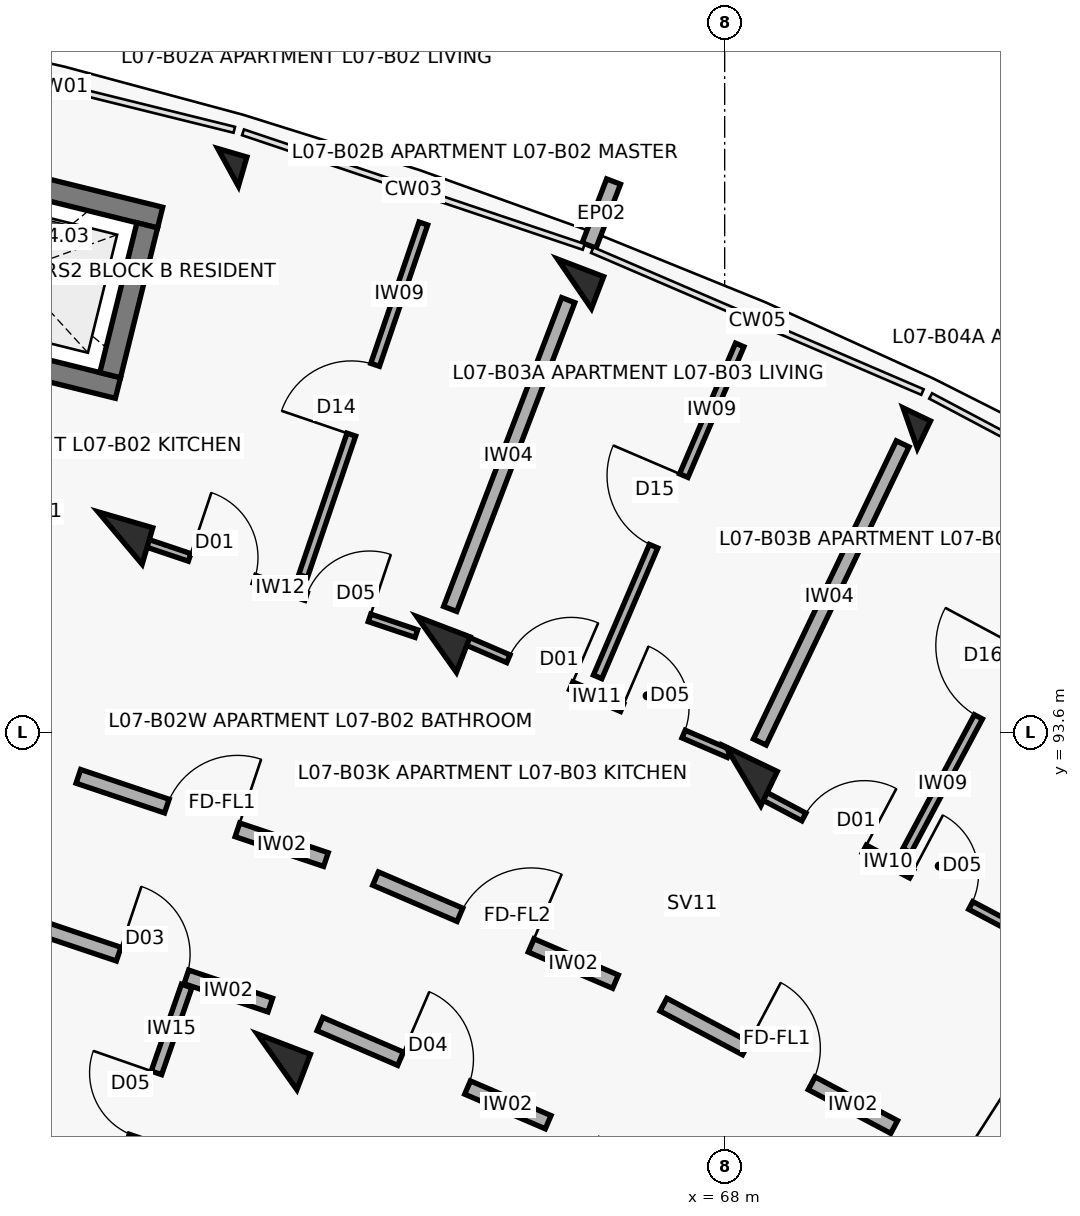
"""IFC4 building model, lengths in metres.
Left out: names, types, materials, properties, quantities, classifications, styles, units other than length and angle.
Written with IfcOpenShell. Run it as: python <this file> out.ifc"""

import sys

from ifc_helpers import new_model, si_unit, direction, frame, frame_2d, origin, origin_2d, place, context, subcontext, project, spatial, rectangle, extrude, element, fill, save


model = new_model("IFC4")
c1 = context("Model", 3, precision=1e-05, world=origin(), true_north=direction((0.0, 1.0)))
c2 = subcontext(c1, "Body", "Model", "MODEL_VIEW")
j1 = project(units=[si_unit("LENGTHUNIT", "METRE"), si_unit("PLANEANGLEUNIT", "RADIAN")], contexts=[c1])
p1 = place(None, origin())
s1 = spatial("IfcSite", under=j1, at=p1, CompositionType="ELEMENT")
p2 = place(p1, origin())
s2 = spatial("IfcBuilding", under=s1, at=p2, CompositionType="ELEMENT")
p3 = place(p2, frame((0.0, 0.0, 23.6)))
s3 = spatial("IfcBuildingStorey", under=s2, at=p3, CompositionType="ELEMENT", Elevation=23.6)
p4 = place(p3, frame((60.046, 96.153, 0.0), z_axis=(0.0, 0.0, 1.0), x_axis=(0.27966144946, 0.96009867914, 0.0)))
e1 = element("IfcColumn", 1, at=p4, inside=s3, PredefinedType="COLUMN", context=c2, shape_type="SweptSolid", body=[
    extrude(rectangle(XDim=0.5, YDim=0.75, at=origin_2d()), origin(), (0.0, 0.0, 1.0), 3.1),
])
p5 = place(p3, frame((61.467, 101.031, 0.0), z_axis=(0.0, 0.0, 1.0), x_axis=(0.27966144946, 0.96009867914, 0.0)))
e2 = element("IfcColumn", 2, at=p5, inside=s3, PredefinedType="COLUMN", context=c2, shape_type="SweptSolid", body=[
    extrude(rectangle(XDim=0.4, YDim=0.4, at=origin_2d()), origin(), (0.0, 0.0, 1.0), 3.1),
])
for number, where, z_axis, x_axis in (
    (3, (62.111, 89.261, 0.0), (0.0, 0.0, 1.0), (0.357, 0.934, 0.0)),
    (4, (64.21, 94.753, 0.0), (0.0, 0.0, 1.0), (0.357, 0.934, 0.0)),
):
    element("IfcColumn", number, at=place(p3, frame(where, z_axis=z_axis, x_axis=x_axis)), inside=s3, PredefinedType="COLUMN", context=c2, shape_type="SweptSolid", body=[
        extrude(rectangle(XDim=0.5, YDim=0.75, at=origin_2d()), origin(), (0.0, 0.0, 1.0), 3.1),
    ])
p6 = place(p3, frame((66.024, 99.499, 0.0), z_axis=(0.0, 0.0, 1.0), x_axis=(0.357064076459, 0.934079892355, 0.0)))
e5 = element("IfcColumn", 5, at=p6, inside=s3, PredefinedType="COLUMN", context=c2, shape_type="SweptSolid", body=[
    extrude(rectangle(XDim=0.45, YDim=0.65, at=origin_2d()), origin(), (0.0, 0.0, 1.0), 3.1),
])
p7 = place(p3, frame((68.246, 93.019, 0.0), z_axis=(0.0, 0.0, 1.0), x_axis=(0.432085748802, 0.901832526405, 0.0)))
e6 = element("IfcColumn", 6, at=p7, inside=s3, PredefinedType="COLUMN", context=c2, shape_type="SweptSolid", body=[
    extrude(rectangle(XDim=0.5, YDim=0.75, at=origin_2d()), origin(), (0.0, 0.0, 1.0), 3.1),
])
p8 = place(p3, frame((70.441, 97.6, 0.0), z_axis=(0.0, 0.0, 1.0), x_axis=(0.432085748802, 0.901832526405, 0.0)))
e7 = element("IfcColumn", 7, at=p8, inside=s3, PredefinedType="COLUMN", context=c2, shape_type="SweptSolid", body=[
    extrude(rectangle(XDim=0.4, YDim=0.4, at=origin_2d()), origin(), (0.0, 0.0, 1.0), 3.1),
])
p9 = place(p3, frame((66.217, 100.003, 0.0), z_axis=(0.0, 0.0, 1.0), x_axis=(0.356942580168, 0.934126326823, 0.0)))
e8 = element("IfcWall", 8, at=p9, inside=s3, PredefinedType="PARAPET", context=c2, shape_type="SweptSolid", body=[
    extrude(rectangle(XDim=0.9, YDim=0.195, at=frame_2d((0.45, 0.0))), origin(), (0.0, 0.0, 1.0), 2.25),
])
p10 = place(p3, frame((60.018, 98.128, 0.0), z_axis=(0.0, 0.0, 1.0), x_axis=(-0.970707542441, 0.240264160972, 0.0)))
e9 = element("IfcWall", 9, at=p10, inside=s3, PredefinedType="SHEAR", context=c2, shape_type="SweptSolid", body=[
    extrude(rectangle(XDim=3.39, YDim=0.28, at=frame_2d((1.695, 0.0))), origin(), (0.0, 0.0, 1.0), 3.1),
])
p11 = place(p10, frame((1.095, 0.0, 0.0)))
e10 = element("IfcOpeningElement", 10, at=p11, cuts=e9, PredefinedType="OPENING", context=c2, shape_type="SweptSolid", body=[
    extrude(rectangle(XDim=1.2, YDim=2.15, at=frame_2d((0.6, 1.075))), frame((0.0, 0.15, 0.0), z_axis=(0.0, -1.0, 0.0), x_axis=(1.0, 0.0, 0.0)), (0.0, 0.0, 1.0), 0.3),
])
p12 = place(p3, frame((60.573, 100.37, 0.0), z_axis=(0.0, 0.0, 1.0), x_axis=(-0.970711699588, 0.240247364777, 0.0)))
e11 = element("IfcWall", 11, at=p12, inside=s3, PredefinedType="SHEAR", context=c2, shape_type="SweptSolid", body=[
    extrude(rectangle(XDim=3.39, YDim=0.28, at=frame_2d((1.695, 0.0))), origin(), (0.0, 0.0, 1.0), 3.1),
])
p13 = place(p3, frame((59.915, 98.297, 0.0), z_axis=(0.0, 0.0, 1.0), x_axis=(0.2402993748, 0.970698825832, 0.0)))
e12 = element("IfcWall", 12, at=p13, inside=s3, PredefinedType="SHEAR", context=c2, shape_type="SweptSolid", body=[
    extrude(rectangle(XDim=2.03, YDim=0.28, at=frame_2d((1.015, 0.0))), origin(), (0.0, 0.0, 1.0), 3.1),
])
p14 = place(p3, frame((59.497, 93.018, 0.0), z_axis=(0.0, 0.0, 1.0), x_axis=(0.947863007629, -0.318678080151, 0.0)))
e13 = element("IfcWall", 13, at=p14, inside=s3, PredefinedType="SOLIDWALL", context=c2, shape_type="SweptSolid", body=[
    extrude(rectangle(XDim=3.436, YDim=0.19, at=frame_2d((1.718, 0.0))), origin(), (0.0, 0.0, 1.0), 2.08),
])
p15 = place(p14, frame((1.228, 0.0, 0.0)))
e14 = element("IfcOpeningElement", 14, at=p15, cuts=e13, PredefinedType="OPENING", context=c2, shape_type="SweptSolid", body=[
    extrude(rectangle(XDim=0.98, YDim=2.15, at=frame_2d((0.49, 1.075))), frame((0.0, 0.105, 0.0), z_axis=(0.0, -1.0, 0.0), x_axis=(1.0, 0.0, 0.0)), (0.0, 0.0, 1.0), 0.21),
])
p16 = place(p3, frame((58.923, 91.049, 0.0), z_axis=(0.0, 0.0, 1.0), x_axis=(0.94787351033, -0.318646839643, 0.0)))
e15 = element("IfcWall", 15, at=p16, inside=s3, PredefinedType="SOLIDWALL", context=c2, shape_type="SweptSolid", body=[
    extrude(rectangle(XDim=3.269, YDim=0.19, at=frame_2d((1.634, 0.0))), origin(), (0.0, 0.0, 1.0), 2.08),
])
p17 = place(p16, frame((1.164, 0.0, 0.0)))
e16 = element("IfcOpeningElement", 16, at=p17, cuts=e15, PredefinedType="OPENING", context=c2, shape_type="SweptSolid", body=[
    extrude(rectangle(XDim=0.94, YDim=2.1, at=frame_2d((0.47, 1.05))), frame((0.0, 0.105, 0.0), z_axis=(0.0, -1.0, 0.0), x_axis=(1.0, 0.0, 0.0)), (0.0, 0.0, 1.0), 0.21),
])
p18 = place(p3, frame((59.837, 87.143, 0.0), z_axis=(0.0, 0.0, 1.0), x_axis=(0.328629662527, 0.944458863534, 0.0)))
e17 = element("IfcWall", 17, at=p18, inside=s3, PredefinedType="PARTITIONING", context=c2, shape_type="SweptSolid", body=[
    extrude(rectangle(XDim=3.3, YDim=0.145, at=frame_2d((1.65, 0.0))), origin(), (0.0, 0.0, 1.0), 2.08),
])
p19 = place(p18, frame((1.21, 0.0, 0.0)))
e18 = element("IfcOpeningElement", 18, at=p19, cuts=e17, PredefinedType="OPENING", context=c2, shape_type="SweptSolid", body=[
    extrude(rectangle(XDim=0.88, YDim=2.1, at=frame_2d((0.44, 1.05))), frame((0.0, 0.083, 0.0), z_axis=(0.0, -1.0, 0.0), x_axis=(1.0, 0.0, 0.0)), (0.0, 0.0, 1.0), 0.165),
])
p20 = place(p3, frame((60.344, 96.106, 0.0), z_axis=(0.0, 0.0, 1.0), x_axis=(0.947876567739, -0.318637744673, 0.0)))
e19 = element("IfcWall", 19, at=p20, inside=s3, PredefinedType="PARTITIONING", context=c2, shape_type="SweptSolid", body=[
    extrude(rectangle(XDim=3.797, YDim=0.105, at=frame_2d((1.899, 0.0))), origin(), (0.0, 0.0, 1.0), 2.08),
])
p21 = place(p20, frame((0.65, 0.0, 0.0)))
e20 = element("IfcOpeningElement", 20, at=p21, cuts=e19, PredefinedType="OPENING", context=c2, shape_type="SweptSolid", body=[
    extrude(rectangle(XDim=0.9, YDim=2.1, at=frame_2d((0.45, 1.05))), frame((0.0, 0.062, 0.0), z_axis=(0.0, -1.0, 0.0), x_axis=(1.0, 0.0, 0.0)), (0.0, 0.0, 1.0), 0.125),
])
p22 = place(p20, frame((2.267, 0.0, 0.0)))
e21 = element("IfcOpeningElement", 21, at=p22, cuts=e19, PredefinedType="OPENING", context=c2, shape_type="SweptSolid", body=[
    extrude(rectangle(XDim=0.88, YDim=2.1, at=frame_2d((0.44, 1.05))), frame((0.0, 0.062, 0.0), z_axis=(0.0, -1.0, 0.0), x_axis=(1.0, 0.0, 0.0)), (0.0, 0.0, 1.0), 0.125),
])
p23 = place(p3, frame((62.453, 95.655, 0.0), z_axis=(0.0, 0.0, 1.0), x_axis=(0.322916379302, 0.946427499589, 0.0)))
e22 = element("IfcWall", 22, at=p23, inside=s3, PredefinedType="PARTITIONING", context=c2, shape_type="SweptSolid", body=[
    extrude(rectangle(XDim=4.9, YDim=0.12, at=frame_2d((2.45, 0.0))), origin(), (0.0, 0.0, 1.0), 2.08),
])
p24 = place(p23, frame((1.965, 0.0, 0.0)))
e23 = element("IfcOpeningElement", 23, at=p24, cuts=e22, PredefinedType="OPENING", context=c2, shape_type="SweptSolid", body=[
    extrude(rectangle(XDim=0.97, YDim=2.1, at=frame_2d((0.485, 1.05))), frame((0.0, 0.07, 0.0), z_axis=(0.0, -1.0, 0.0), x_axis=(1.0, 0.0, 0.0)), (0.0, 0.0, 1.0), 0.14),
])
p25 = place(p3, frame((63.407, 91.673, 0.0), z_axis=(0.0, 0.0, 1.0), x_axis=(0.918718172399, -0.394913813008, 0.0)))
e24 = element("IfcWall", 24, at=p25, inside=s3, PredefinedType="SOLIDWALL", context=c2, shape_type="SweptSolid", body=[
    extrude(rectangle(XDim=3.436, YDim=0.19, at=frame_2d((1.718, 0.0))), origin(), (0.0, 0.0, 1.0), 2.08),
])
p26 = place(p25, frame((1.208, 0.0, 0.0)))
e25 = element("IfcOpeningElement", 25, at=p26, cuts=e24, PredefinedType="OPENING", context=c2, shape_type="SweptSolid", body=[
    extrude(rectangle(XDim=1.02, YDim=2.15, at=frame_2d((0.51, 1.075))), frame((0.0, 0.105, 0.0), z_axis=(0.0, -1.0, 0.0), x_axis=(1.0, 0.0, 0.0)), (0.0, 0.0, 1.0), 0.21),
])
p27 = place(p3, frame((62.675, 89.758, 0.0), z_axis=(0.0, 0.0, 1.0), x_axis=(0.918723391052, -0.394901672235, 0.0)))
e26 = element("IfcWall", 26, at=p27, inside=s3, PredefinedType="SOLIDWALL", context=c2, shape_type="SweptSolid", body=[
    extrude(rectangle(XDim=3.269, YDim=0.19, at=frame_2d((1.634, 0.0))), origin(), (0.0, 0.0, 1.0), 2.08),
])
p28 = place(p27, frame((1.154, 0.0, 0.0)))
e27 = element("IfcOpeningElement", 27, at=p28, cuts=e26, PredefinedType="OPENING", context=c2, shape_type="SweptSolid", body=[
    extrude(rectangle(XDim=0.96, YDim=2.1, at=frame_2d((0.48, 1.05))), frame((0.0, 0.105, 0.0), z_axis=(0.0, -1.0, 0.0), x_axis=(1.0, 0.0, 0.0)), (0.0, 0.0, 1.0), 0.21),
])
p29 = place(p3, frame((64.557, 94.822, 0.0), z_axis=(0.0, 0.0, 1.0), x_axis=(0.918726854017, -0.394893615684, 0.0)))
e28 = element("IfcWall", 28, at=p29, inside=s3, PredefinedType="PARTITIONING", context=c2, shape_type="SweptSolid", body=[
    extrude(rectangle(XDim=3.81, YDim=0.11, at=frame_2d((1.905, 0.0))), origin(), (0.0, 0.0, 1.0), 2.08),
])
p30 = place(p29, frame((0.65, 0.0, 0.0)))
e29 = element("IfcOpeningElement", 29, at=p30, cuts=e28, PredefinedType="OPENING", context=c2, shape_type="SweptSolid", body=[
    extrude(rectangle(XDim=0.9, YDim=2.1, at=frame_2d((0.45, 1.05))), frame((0.0, 0.065, 0.0), z_axis=(0.0, -1.0, 0.0), x_axis=(1.0, 0.0, 0.0)), (0.0, 0.0, 1.0), 0.13),
])
p31 = place(p29, frame((2.28, 0.0, 0.0)))
e30 = element("IfcOpeningElement", 30, at=p31, cuts=e28, PredefinedType="OPENING", context=c2, shape_type="SweptSolid", body=[
    extrude(rectangle(XDim=0.88, YDim=2.1, at=frame_2d((0.44, 1.05))), frame((0.0, 0.065, 0.0), z_axis=(0.0, -1.0, 0.0), x_axis=(1.0, 0.0, 0.0)), (0.0, 0.0, 1.0), 0.13),
])
p32 = place(p3, frame((66.329, 94.327, 0.0), z_axis=(0.0, 0.0, 1.0), x_axis=(0.393553279267, 0.919301809189, 0.0)))
e31 = element("IfcWall", 31, at=p32, inside=s3, PredefinedType="PARTITIONING", context=c2, shape_type="SweptSolid", body=[
    extrude(rectangle(XDim=4.75, YDim=0.12, at=frame_2d((2.375, 0.0))), origin(), (0.0, 0.0, 1.0), 2.08),
])
p33 = place(p32, frame((1.87, 0.0, 0.0)))
e32 = element("IfcOpeningElement", 32, at=p33, cuts=e31, PredefinedType="OPENING", context=c2, shape_type="SweptSolid", body=[
    extrude(rectangle(XDim=1.01, YDim=2.1, at=frame_2d((0.505, 1.05))), frame((0.0, 0.07, 0.0), z_axis=(0.0, -1.0, 0.0), x_axis=(1.0, 0.0, 0.0)), (0.0, 0.0, 1.0), 0.14),
])
p34 = place(p3, frame((64.389, 95.22, 0.0), z_axis=(0.0, 0.0, 1.0), x_axis=(0.357064016205, 0.934079915388, 0.0)))
e33 = element("IfcWall", 33, at=p34, inside=s3, PredefinedType="SOLIDWALL", context=c2, shape_type="SweptSolid", body=[
    extrude(rectangle(XDim=4.35, YDim=0.185, at=frame_2d((2.175, 0.0))), origin(), (0.0, 0.0, 1.0), 2.08),
])
p35 = place(p3, frame((67.194, 90.014, 0.0), z_axis=(0.0, 0.0, 1.0), x_axis=(0.883410853063, -0.468599258099, 0.0)))
e34 = element("IfcWall", 34, at=p35, inside=s3, PredefinedType="SOLIDWALL", context=c2, shape_type="SweptSolid", body=[
    extrude(rectangle(XDim=3.436, YDim=0.19, at=frame_2d((1.718, 0.0))), origin(), (0.0, 0.0, 1.0), 2.08),
])
p36 = place(p35, frame((1.228, 0.0, 0.0)))
e35 = element("IfcOpeningElement", 35, at=p36, cuts=e34, PredefinedType="OPENING", context=c2, shape_type="SweptSolid", body=[
    extrude(rectangle(XDim=0.98, YDim=2.15, at=frame_2d((0.49, 1.075))), frame((0.0, 0.105, 0.0), z_axis=(0.0, -1.0, 0.0), x_axis=(1.0, 0.0, 0.0)), (0.0, 0.0, 1.0), 0.21),
])
p37 = place(p3, frame((68.468, 92.788, 0.0), z_axis=(0.0, 0.0, 1.0), x_axis=(0.883450371448, -0.468524749814, 0.0)))
e36 = element("IfcWall", 36, at=p37, inside=s3, PredefinedType="PARTITIONING", context=c2, shape_type="SweptSolid", body=[
    extrude(rectangle(XDim=3.785, YDim=0.115, at=frame_2d((1.893, 0.0))), origin(), (0.0, 0.0, 1.0), 2.08),
])
p38 = place(p37, frame((0.65, 0.0, 0.0)))
e37 = element("IfcOpeningElement", 37, at=p38, cuts=e36, PredefinedType="OPENING", context=c2, shape_type="SweptSolid", body=[
    extrude(rectangle(XDim=0.9, YDim=2.1, at=frame_2d((0.45, 1.05))), frame((0.0, 0.067, 0.0), z_axis=(0.0, -1.0, 0.0), x_axis=(1.0, 0.0, 0.0)), (0.0, 0.0, 1.0), 0.135),
])
p39 = place(p37, frame((2.255, 0.0, 0.0)))
e38 = element("IfcOpeningElement", 38, at=p39, cuts=e36, PredefinedType="OPENING", context=c2, shape_type="SweptSolid", body=[
    extrude(rectangle(XDim=0.88, YDim=2.1, at=frame_2d((0.44, 1.05))), frame((0.0, 0.067, 0.0), z_axis=(0.0, -1.0, 0.0), x_axis=(1.0, 0.0, 0.0)), (0.0, 0.0, 1.0), 0.135),
])
p40 = place(p3, frame((70.398, 92.041, 0.0), z_axis=(0.0, 0.0, 1.0), x_axis=(0.471222960991, 0.882014127457, 0.0)))
e39 = element("IfcWall", 39, at=p40, inside=s3, PredefinedType="PARTITIONING", context=c2, shape_type="SweptSolid", body=[
    extrude(rectangle(XDim=5.05, YDim=0.12, at=frame_2d((2.525, 0.0))), origin(), (0.0, 0.0, 1.0), 2.08),
])
p41 = place(p40, frame((1.995, 0.0, 0.0)))
e40 = element("IfcOpeningElement", 40, at=p41, cuts=e39, PredefinedType="OPENING", context=c2, shape_type="SweptSolid", body=[
    extrude(rectangle(XDim=1.06, YDim=2.1, at=frame_2d((0.53, 1.05))), frame((0.0, 0.07, 0.0), z_axis=(0.0, -1.0, 0.0), x_axis=(1.0, 0.0, 0.0)), (0.0, 0.0, 1.0), 0.14),
])
p42 = place(p3, frame((68.462, 93.469, 0.0), z_axis=(0.0, 0.0, 1.0), x_axis=(0.432086898897, 0.901831975371, 0.0)))
e41 = element("IfcWall", 41, at=p42, inside=s3, PredefinedType="SOLIDWALL", context=c2, shape_type="SweptSolid", body=[
    extrude(rectangle(XDim=4.35, YDim=0.185, at=frame_2d((2.175, 0.0))), origin(), (0.0, 0.0, 1.0), 2.08),
])
p43 = place(p15, origin())
e42 = element("IfcDoor", 42, at=p43, inside=s3, OperationType="SINGLE_SWING_RIGHT", PredefinedType="DOOR", context=c2, shape_type="SweptSolid", body=[
    extrude(rectangle(XDim=0.98, YDim=2.15, at=frame_2d((0.49, 1.075))), frame((0.0, 0.025, 0.0), z_axis=(0.0, -1.0, 0.0), x_axis=(1.0, 0.0, 0.0)), (0.0, 0.0, 1.0), 0.05),
])
fill(e14, e42)
p44 = place(p17, origin())
e43 = element("IfcDoor", 43, at=p44, inside=s3, OperationType="SINGLE_SWING_LEFT", PredefinedType="DOOR", context=c2, shape_type="SweptSolid", body=[
    extrude(rectangle(XDim=0.94, YDim=2.1, at=frame_2d((0.47, 1.05))), frame((0.0, 0.025, 0.0), z_axis=(0.0, -1.0, 0.0), x_axis=(1.0, 0.0, 0.0)), (0.0, 0.0, 1.0), 0.05),
])
fill(e16, e43)
p45 = place(p19, origin())
e44 = element("IfcDoor", 44, at=p45, inside=s3, OperationType="SINGLE_SWING_RIGHT", PredefinedType="DOOR", context=c2, shape_type="SweptSolid", body=[
    extrude(rectangle(XDim=0.88, YDim=2.1, at=frame_2d((0.44, 1.05))), frame((0.0, 0.025, 0.0), z_axis=(0.0, -1.0, 0.0), x_axis=(1.0, 0.0, 0.0)), (0.0, 0.0, 1.0), 0.05),
])
fill(e18, e44)
p46 = place(p21, origin())
e45 = element("IfcDoor", 45, at=p46, inside=s3, OperationType="SINGLE_SWING_LEFT", PredefinedType="DOOR", context=c2, shape_type="SweptSolid", body=[
    extrude(rectangle(XDim=0.9, YDim=2.1, at=frame_2d((0.45, 1.05))), frame((0.0, 0.025, 0.0), z_axis=(0.0, -1.0, 0.0), x_axis=(1.0, 0.0, 0.0)), (0.0, 0.0, 1.0), 0.05),
])
fill(e20, e45)
p47 = place(p22, origin())
e46 = element("IfcDoor", 46, at=p47, inside=s3, OperationType="SINGLE_SWING_RIGHT", PredefinedType="DOOR", context=c2, shape_type="SweptSolid", body=[
    extrude(rectangle(XDim=0.88, YDim=2.1, at=frame_2d((0.44, 1.05))), frame((0.0, 0.025, 0.0), z_axis=(0.0, -1.0, 0.0), x_axis=(1.0, 0.0, 0.0)), (0.0, 0.0, 1.0), 0.05),
])
fill(e21, e46)
p48 = place(p24, origin())
e47 = element("IfcDoor", 47, at=p48, inside=s3, OperationType="SINGLE_SWING_LEFT", PredefinedType="DOOR", context=c2, shape_type="SweptSolid", body=[
    extrude(rectangle(XDim=0.97, YDim=2.1, at=frame_2d((0.485, 1.05))), frame((0.0, 0.025, 0.0), z_axis=(0.0, -1.0, 0.0), x_axis=(1.0, 0.0, 0.0)), (0.0, 0.0, 1.0), 0.05),
])
fill(e23, e47)
p49 = place(p26, origin())
e48 = element("IfcDoor", 48, at=p49, inside=s3, OperationType="SINGLE_SWING_RIGHT", PredefinedType="DOOR", context=c2, shape_type="SweptSolid", body=[
    extrude(rectangle(XDim=1.02, YDim=2.15, at=frame_2d((0.51, 1.075))), frame((0.0, 0.025, 0.0), z_axis=(0.0, -1.0, 0.0), x_axis=(1.0, 0.0, 0.0)), (0.0, 0.0, 1.0), 0.05),
])
fill(e25, e48)
p50 = place(p28, origin())
e49 = element("IfcDoor", 49, at=p50, inside=s3, OperationType="SINGLE_SWING_LEFT", PredefinedType="DOOR", context=c2, shape_type="SweptSolid", body=[
    extrude(rectangle(XDim=0.96, YDim=2.1, at=frame_2d((0.48, 1.05))), frame((0.0, 0.025, 0.0), z_axis=(0.0, -1.0, 0.0), x_axis=(1.0, 0.0, 0.0)), (0.0, 0.0, 1.0), 0.05),
])
fill(e27, e49)
p51 = place(p30, origin())
e50 = element("IfcDoor", 50, at=p51, inside=s3, OperationType="SINGLE_SWING_RIGHT", PredefinedType="DOOR", context=c2, shape_type="SweptSolid", body=[
    extrude(rectangle(XDim=0.9, YDim=2.1, at=frame_2d((0.45, 1.05))), frame((0.0, 0.025, 0.0), z_axis=(0.0, -1.0, 0.0), x_axis=(1.0, 0.0, 0.0)), (0.0, 0.0, 1.0), 0.05),
])
fill(e29, e50)
p52 = place(p31, origin())
e51 = element("IfcDoor", 51, at=p52, inside=s3, OperationType="SINGLE_SWING_LEFT", PredefinedType="DOOR", context=c2, shape_type="SweptSolid", body=[
    extrude(rectangle(XDim=0.88, YDim=2.1, at=frame_2d((0.44, 1.05))), frame((0.0, 0.025, 0.0), z_axis=(0.0, -1.0, 0.0), x_axis=(1.0, 0.0, 0.0)), (0.0, 0.0, 1.0), 0.05),
])
fill(e30, e51)
p53 = place(p33, origin())
e52 = element("IfcDoor", 52, at=p53, inside=s3, OperationType="SINGLE_SWING_RIGHT", PredefinedType="DOOR", context=c2, shape_type="SweptSolid", body=[
    extrude(rectangle(XDim=1.01, YDim=2.1, at=frame_2d((0.505, 1.05))), frame((0.0, 0.025, 0.0), z_axis=(0.0, -1.0, 0.0), x_axis=(1.0, 0.0, 0.0)), (0.0, 0.0, 1.0), 0.05),
])
fill(e32, e52)
p54 = place(p36, origin())
e53 = element("IfcDoor", 53, at=p54, inside=s3, OperationType="SINGLE_SWING_LEFT", PredefinedType="DOOR", context=c2, shape_type="SweptSolid", body=[
    extrude(rectangle(XDim=0.98, YDim=2.15, at=frame_2d((0.49, 1.075))), frame((0.0, 0.025, 0.0), z_axis=(0.0, -1.0, 0.0), x_axis=(1.0, 0.0, 0.0)), (0.0, 0.0, 1.0), 0.05),
])
fill(e35, e53)
p55 = place(p38, origin())
e54 = element("IfcDoor", 54, at=p55, inside=s3, OperationType="SINGLE_SWING_RIGHT", PredefinedType="DOOR", context=c2, shape_type="SweptSolid", body=[
    extrude(rectangle(XDim=0.9, YDim=2.1, at=frame_2d((0.45, 1.05))), frame((0.0, 0.025, 0.0), z_axis=(0.0, -1.0, 0.0), x_axis=(1.0, 0.0, 0.0)), (0.0, 0.0, 1.0), 0.05),
])
fill(e37, e54)
p56 = place(p39, origin())
e55 = element("IfcDoor", 55, at=p56, inside=s3, OperationType="SINGLE_SWING_LEFT", PredefinedType="DOOR", context=c2, shape_type="SweptSolid", body=[
    extrude(rectangle(XDim=0.88, YDim=2.1, at=frame_2d((0.44, 1.05))), frame((0.0, 0.025, 0.0), z_axis=(0.0, -1.0, 0.0), x_axis=(1.0, 0.0, 0.0)), (0.0, 0.0, 1.0), 0.05),
])
fill(e38, e55)
p57 = place(p41, origin())
e56 = element("IfcDoor", 56, at=p57, inside=s3, OperationType="SINGLE_SWING_RIGHT", PredefinedType="DOOR", context=c2, shape_type="SweptSolid", body=[
    extrude(rectangle(XDim=1.06, YDim=2.1, at=frame_2d((0.53, 1.05))), frame((0.0, 0.025, 0.0), z_axis=(0.0, -1.0, 0.0), x_axis=(1.0, 0.0, 0.0)), (0.0, 0.0, 1.0), 0.05),
])
fill(e40, e56)
save(model, sys.argv[1])
